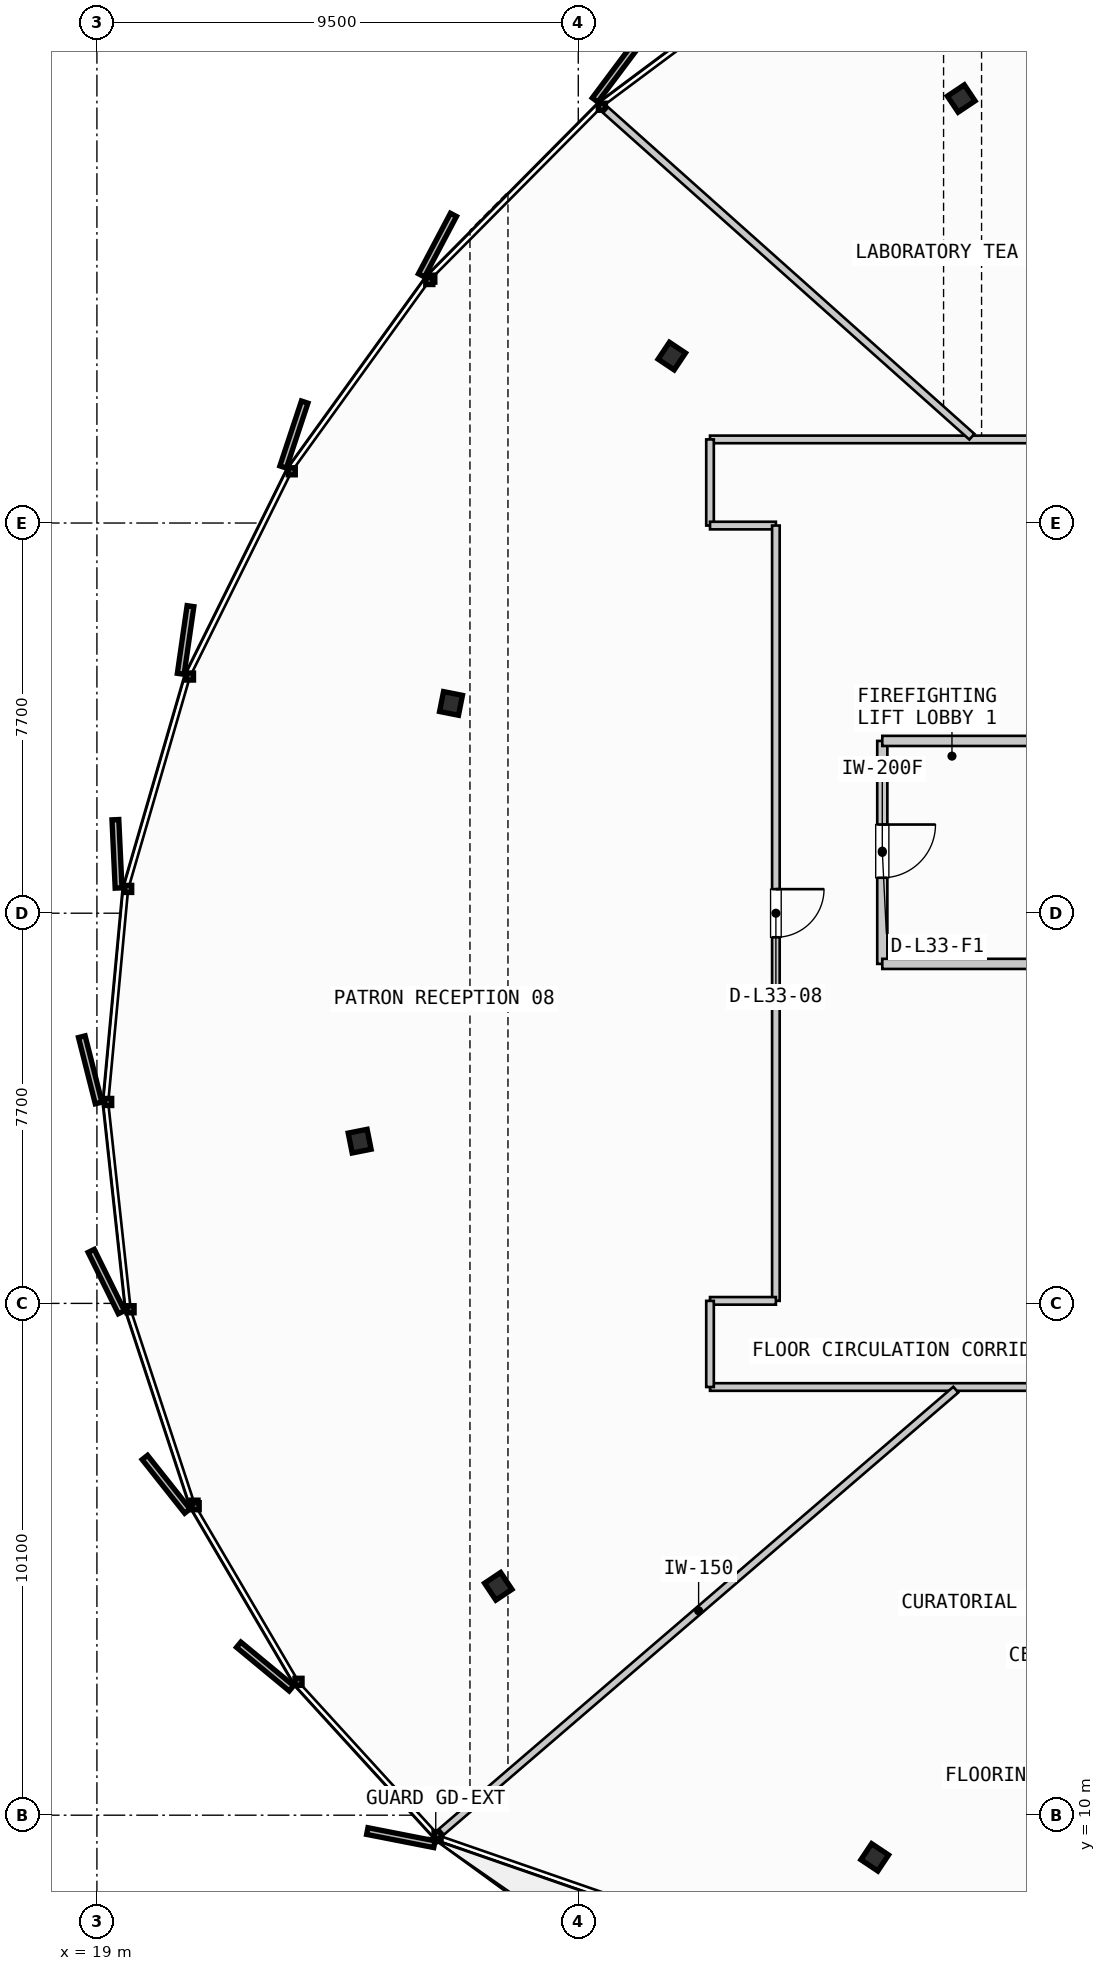
"""IFC4 building model, lengths in metres.
Left out: names, types, materials, properties, quantities, classifications, styles, units other than length and angle.
Written with IfcOpenShell. Run it as: python <this file> out.ifc"""

import sys

from ifc_helpers import new_model, si_unit, direction, frame, frame_2d, origin, origin_2d, place, context, subcontext, project, spatial, rectangle, i_section, extrude, source, transform, mapped, element, fill, save


model = new_model("IFC4")
c1 = context("Model", 3, precision=1e-05, world=origin(), true_north=direction((0.0, 1.0)))
c2 = subcontext(c1, "Body", "Model", "MODEL_VIEW")
j1 = project(units=[si_unit("LENGTHUNIT", "METRE"), si_unit("PLANEANGLEUNIT", "RADIAN")], contexts=[c1])
p1 = place(None, origin())
s1 = spatial("IfcSite", under=j1, at=p1, CompositionType="ELEMENT")
p2 = place(p1, origin())
s2 = spatial("IfcBuilding", under=s1, at=p2, CompositionType="ELEMENT")
p3 = place(p2, frame((0.0, 0.0, 132.35)))
s3 = spatial("IfcBuildingStorey", under=s2, at=p3, CompositionType="ELEMENT", Elevation=132.35)
m1 = source(origin(), c2, "Body", "SweptSolid", [
    extrude(i_section(OverallWidth=0.401, OverallDepth=0.381, WebThickness=0.032, FlangeThickness=0.051, FilletRadius=0.015, at=origin_2d()), origin(), (0.0, 0.0, 1.0), 3.3),
])
for number, where, z_axis, x_axis in (
    (1, (36.058, 43.877, 0.0), (0.0, 0.0, 1.0), (-0.556, 0.831, 0.0)),
    (2, (30.346, 38.794, 0.0), (0.0, 0.0, 1.0), (-0.831, 0.556, 0.0)),
    (3, (25.989, 31.94, 0.0), (0.0, 0.0, 1.0), (-0.981, 0.195, 0.0)),
    (4, (24.185, 23.302, 0.0), (0.0, 0.0, 1.0), (-0.981, -0.195, 0.0)),
    (5, (26.921, 14.517, 0.0), (0.0, 0.0, 1.0), (-0.831, -0.556, 0.0)),
    (6, (34.351, 9.168, 0.0), (0.0, 0.0, 1.0), (-0.556, -0.831, 0.0)),
):
    element("IfcColumn", number, at=place(p3, frame(where, z_axis=z_axis, x_axis=x_axis)), inside=s3, PredefinedType="COLUMN", context=c2, shape_type="MappedRepresentation", body=[
        mapped(m1, transform((0.0, 0.0, 0.0), scale=1.0)),
    ])
p4 = place(p3, frame((34.5, 31.2, 0.0), z_axis=(0.0, 0.0, 1.0), x_axis=(0.0, -1.0, 0.0)))
e7 = element("IfcWall", 7, at=p4, inside=s3, PredefinedType="PARTITIONING", context=c2, shape_type="SweptSolid", body=[
    extrude(rectangle(XDim=4.4, YDim=0.2, at=frame_2d((2.2, 0.0))), origin(), (0.0, 0.0, 1.0), 2.445),
])
p5 = place(p4, frame((1.65, 0.0, 0.0)))
e8 = element("IfcOpeningElement", 8, at=p5, cuts=e7, PredefinedType="OPENING", context=c2, shape_type="SweptSolid", body=[
    extrude(rectangle(XDim=1.05, YDim=2.15, at=frame_2d((0.525, 1.075))), frame((0.0, 0.11, 0.0), z_axis=(0.0, -1.0, 0.0), x_axis=(1.0, 0.0, 0.0)), (0.0, 0.0, 1.0), 0.22),
])
for number, where, z_axis, x_axis in (
    (9, (34.5, 26.8, 0.0), (0.0, 0.0, 1.0), (1.0, 0.0, 0.0)),
    (10, (34.5, 31.2, 0.0), (0.0, 0.0, 1.0), (1.0, 0.0, 0.0)),
):
    element("IfcWall", number, at=place(p3, frame(where, z_axis=z_axis, x_axis=x_axis)), inside=s3, PredefinedType="PARTITIONING", context=c2, shape_type="SweptSolid", body=[
        extrude(rectangle(XDim=3.215, YDim=0.2, at=frame_2d((1.607, 0.0))), origin(), (0.0, 0.0, 1.0), 2.445),
    ])
p6 = place(p3, frame((31.1, 18.45, 0.0), z_axis=(0.0, 0.0, 1.0), x_axis=(1.0, 0.0, 0.0)))
e11 = element("IfcWall", 11, at=p6, inside=s3, PredefinedType="PARTITIONING", context=c2, shape_type="SweptSolid", body=[
    extrude(rectangle(XDim=31.4, YDim=0.15, at=frame_2d((15.7, 0.0))), origin(), (0.0, 0.0, 1.0), 2.445),
])
p7 = place(p6, frame((9.754, 0.0, 0.0)))
e12 = element("IfcOpeningElement", 12, at=p7, cuts=e11, PredefinedType="OPENING", context=c2, shape_type="SweptSolid", body=[
    extrude(rectangle(XDim=0.95, YDim=2.15, at=frame_2d((0.475, 1.075))), frame((0.0, 0.085, 0.0), z_axis=(0.0, -1.0, 0.0), x_axis=(1.0, 0.0, 0.0)), (0.0, 0.0, 1.0), 0.17),
])
p8 = place(p6, frame((20.563, 0.0, 0.0)))
e13 = element("IfcOpeningElement", 13, at=p8, cuts=e11, PredefinedType="OPENING", context=c2, shape_type="SweptSolid", body=[
    extrude(rectangle(XDim=0.95, YDim=2.15, at=frame_2d((0.475, 1.075))), frame((0.0, 0.085, 0.0), z_axis=(0.0, -1.0, 0.0), x_axis=(1.0, 0.0, 0.0)), (0.0, 0.0, 1.0), 0.17),
])
p9 = place(p3, frame((62.5, 37.15, 0.0), z_axis=(0.0, 0.0, 1.0), x_axis=(-1.0, 0.0, 0.0)))
e14 = element("IfcWall", 14, at=p9, inside=s3, PredefinedType="PARTITIONING", context=c2, shape_type="SweptSolid", body=[
    extrude(rectangle(XDim=31.4, YDim=0.15, at=frame_2d((15.7, 0.0))), origin(), (0.0, 0.0, 1.0), 2.445),
])
p10 = place(p9, frame((7.755, 0.0, 0.0)))
e15 = element("IfcOpeningElement", 15, at=p10, cuts=e14, PredefinedType="OPENING", context=c2, shape_type="SweptSolid", body=[
    extrude(rectangle(XDim=0.95, YDim=2.15, at=frame_2d((0.475, 1.075))), frame((0.0, 0.085, 0.0), z_axis=(0.0, -1.0, 0.0), x_axis=(1.0, 0.0, 0.0)), (0.0, 0.0, 1.0), 0.17),
])
p11 = place(p9, frame((15.451, 0.0, 0.0)))
e16 = element("IfcOpeningElement", 16, at=p11, cuts=e14, PredefinedType="OPENING", context=c2, shape_type="SweptSolid", body=[
    extrude(rectangle(XDim=0.95, YDim=2.15, at=frame_2d((0.475, 1.075))), frame((0.0, 0.085, 0.0), z_axis=(0.0, -1.0, 0.0), x_axis=(1.0, 0.0, 0.0)), (0.0, 0.0, 1.0), 0.17),
])
p12 = place(p9, frame((22.642, 0.0, 0.0)))
e17 = element("IfcOpeningElement", 17, at=p12, cuts=e14, PredefinedType="OPENING", context=c2, shape_type="SweptSolid", body=[
    extrude(rectangle(XDim=0.95, YDim=2.15, at=frame_2d((0.475, 1.075))), frame((0.0, 0.085, 0.0), z_axis=(0.0, -1.0, 0.0), x_axis=(1.0, 0.0, 0.0)), (0.0, 0.0, 1.0), 0.17),
])
p13 = place(p3, frame((31.1, 37.15, 0.0), z_axis=(0.0, 0.0, 1.0), x_axis=(0.0, -1.0, 0.0)))
e18 = element("IfcWall", 18, at=p13, inside=s3, PredefinedType="PARTITIONING", context=c2, shape_type="SweptSolid", body=[
    extrude(rectangle(XDim=1.7, YDim=0.15, at=frame_2d((0.85, 0.0))), origin(), (0.0, 0.0, 1.0), 2.445),
])
p14 = place(p3, frame((31.1, 35.45, 0.0), z_axis=(0.0, 0.0, 1.0), x_axis=(1.0, 0.0, 0.0)))
e19 = element("IfcWall", 19, at=p14, inside=s3, PredefinedType="PARTITIONING", context=c2, shape_type="SweptSolid", body=[
    extrude(rectangle(XDim=1.3, YDim=0.15, at=frame_2d((0.65, 0.0))), origin(), (0.0, 0.0, 1.0), 2.445),
])
p15 = place(p3, frame((32.4, 35.45, 0.0), z_axis=(0.0, 0.0, 1.0), x_axis=(0.0, -1.0, 0.0)))
e20 = element("IfcWall", 20, at=p15, inside=s3, PredefinedType="PARTITIONING", context=c2, shape_type="SweptSolid", body=[
    extrude(rectangle(XDim=15.3, YDim=0.15, at=frame_2d((7.65, 0.0))), origin(), (0.0, 0.0, 1.0), 2.445),
])
p16 = place(p15, frame((7.175, 0.0, 0.0)))
e21 = element("IfcOpeningElement", 21, at=p16, cuts=e20, PredefinedType="OPENING", context=c2, shape_type="SweptSolid", body=[
    extrude(rectangle(XDim=0.95, YDim=2.15, at=frame_2d((0.475, 1.075))), frame((0.0, 0.085, 0.0), z_axis=(0.0, -1.0, 0.0), x_axis=(1.0, 0.0, 0.0)), (0.0, 0.0, 1.0), 0.17),
])
p17 = place(p3, frame((32.4, 20.15, 0.0), z_axis=(0.0, 0.0, 1.0), x_axis=(-1.0, 0.0, 0.0)))
e22 = element("IfcWall", 22, at=p17, inside=s3, PredefinedType="PARTITIONING", context=c2, shape_type="SweptSolid", body=[
    extrude(rectangle(XDim=1.3, YDim=0.15, at=frame_2d((0.65, 0.0))), origin(), (0.0, 0.0, 1.0), 2.445),
])
p18 = place(p3, frame((31.1, 20.15, 0.0), z_axis=(0.0, 0.0, 1.0), x_axis=(0.0, -1.0, 0.0)))
e23 = element("IfcWall", 23, at=p18, inside=s3, PredefinedType="PARTITIONING", context=c2, shape_type="SweptSolid", body=[
    extrude(rectangle(XDim=1.7, YDim=0.15, at=frame_2d((0.85, 0.0))), origin(), (0.0, 0.0, 1.0), 2.445),
])
p19 = place(p3, frame((35.951, 18.398, 0.0), z_axis=(0.0, 0.0, 1.0), x_axis=(-0.758343132759, -0.651855576793, 0.0)))
e24 = element("IfcWall", 24, at=p19, inside=s3, PredefinedType="PARTITIONING", context=c2, shape_type="SweptSolid", body=[
    extrude(rectangle(XDim=13.387, YDim=0.15, at=frame_2d((6.693, 0.0))), origin(), (0.0, 0.0, 1.0), 2.445),
])
p20 = place(p3, frame((42.545, 37.223, 0.0), z_axis=(0.0, 0.0, 1.0), x_axis=(-0.410961449485, 0.911652722827, 0.0)))
e25 = element("IfcWall", 25, at=p20, inside=s3, PredefinedType="PARTITIONING", context=c2, shape_type="SweptSolid", body=[
    extrude(rectangle(XDim=12.807, YDim=0.15, at=frame_2d((6.403, 0.0))), origin(), (0.0, 0.0, 1.0), 2.445),
])
p21 = place(p3, frame((36.268, 37.203, 0.0), z_axis=(0.0, 0.0, 1.0), x_axis=(-0.746338755333, 0.665566271898, 0.0)))
e26 = element("IfcWall", 26, at=p21, inside=s3, PredefinedType="PARTITIONING", context=c2, shape_type="SweptSolid", body=[
    extrude(rectangle(XDim=9.684, YDim=0.15, at=frame_2d((4.842, 0.0))), origin(), (0.0, 0.0, 1.0), 2.445),
])
m2 = source(origin(), c2, "Body", "SweptSolid", [
    extrude(rectangle(XDim=1.05, YDim=2.15, at=frame_2d((0.525, 1.075))), frame((0.0, 0.025, 0.0), z_axis=(0.0, -1.0, 0.0), x_axis=(1.0, 0.0, 0.0)), (0.0, 0.0, 1.0), 0.05),
])
p22 = place(p5, origin())
e27 = element("IfcDoor", 27, at=p22, inside=s3, OperationType="SINGLE_SWING_LEFT", PredefinedType="DOOR", context=c2, shape_type="MappedRepresentation", body=[
    mapped(m2, transform((0.0, 0.0, 0.0), scale=1.0)),
])
fill(e8, e27)
m3 = source(origin(), c2, "Body", "SweptSolid", [
    extrude(rectangle(XDim=0.95, YDim=2.15, at=frame_2d((0.475, 1.075))), frame((0.0, 0.025, 0.0), z_axis=(0.0, -1.0, 0.0), x_axis=(1.0, 0.0, 0.0)), (0.0, 0.0, 1.0), 0.05),
])
p23 = place(p16, origin())
e28 = element("IfcDoor", 28, at=p23, inside=s3, OperationType="SINGLE_SWING_LEFT", PredefinedType="DOOR", context=c2, shape_type="MappedRepresentation", body=[
    mapped(m3, transform((0.0, 0.0, 0.0), scale=1.0)),
])
fill(e21, e28)
save(model, sys.argv[1])
